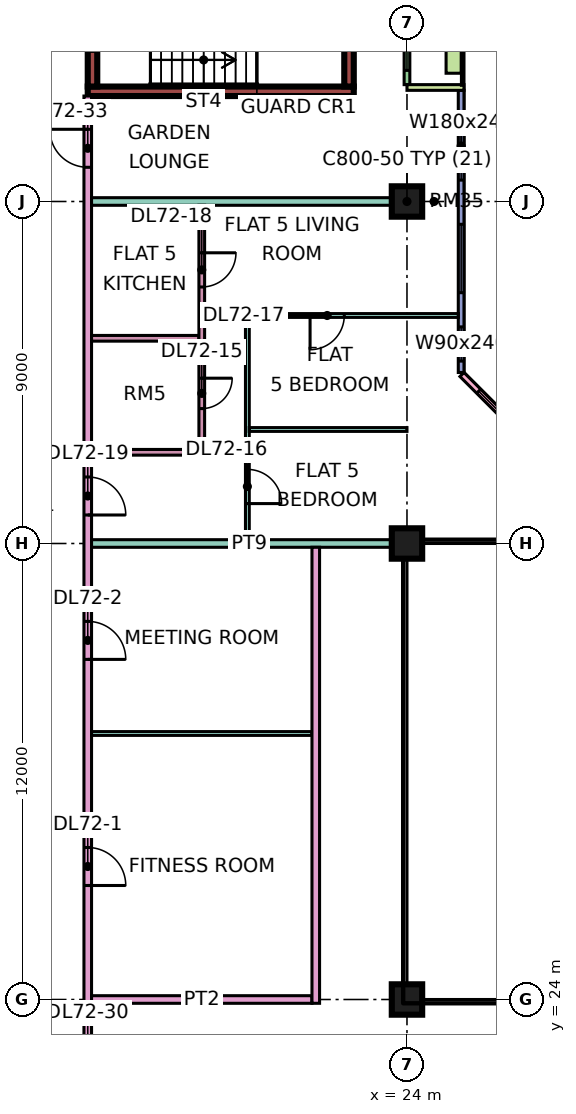
"""IFC4 building model, lengths in metres.
Left out: names, types, materials, properties, quantities, classifications, styles, units other than length and angle.
Written with IfcOpenShell. Run it as: python <this file> out.ifc"""

import sys

from ifc_helpers import new_model, si_unit, direction, frame, frame_2d, origin, origin_2d, place, context, subcontext, project, spatial, rectangle, extrude, element, fill, save


model = new_model("IFC4")
c1 = context("Model", 3, precision=1e-05, world=origin(), true_north=direction((0.0, 1.0)))
c2 = subcontext(c1, "Body", "Model", "MODEL_VIEW")
j1 = project(units=[si_unit("LENGTHUNIT", "METRE"), si_unit("PLANEANGLEUNIT", "RADIAN")], contexts=[c1])
p1 = place(None, origin())
s1 = spatial("IfcSite", under=j1, at=p1, CompositionType="ELEMENT")
p2 = place(p1, origin())
s2 = spatial("IfcBuilding", under=s1, at=p2, CompositionType="ELEMENT")
p3 = place(p2, frame((0.0, 0.0, 307.15)))
s3 = spatial("IfcBuildingStorey", under=s2, at=p3, CompositionType="ELEMENT", Elevation=307.15)
for number, where, z_axis, x_axis in (
    (1, (24.0, 24.0, 0.0), (0.0, 0.0, 1.0), (1.0, 0.0, 0.0)),
    (2, (24.0, 36.0, 0.0), (0.0, 0.0, 1.0), (1.0, 0.0, 0.0)),
    (3, (24.0, 45.0, 0.0), (0.0, 0.0, 1.0), (1.0, 0.0, 0.0)),
):
    element("IfcColumn", number, at=place(p3, frame(where, z_axis=z_axis, x_axis=x_axis)), inside=s3, PredefinedType="COLUMN", context=c2, shape_type="SweptSolid", body=[
        extrude(rectangle(XDim=0.8, YDim=0.8, at=origin_2d()), origin(), (0.0, 0.0, 1.0), 3.75),
    ])
p4 = place(p3, frame((15.6, 47.9, 0.0), z_axis=(0.0, 0.0, 1.0), x_axis=(1.0, 0.0, 0.0)))
e4 = element("IfcWall", 4, at=p4, inside=s3, PredefinedType="SHEAR", context=c2, shape_type="SweptSolid", body=[
    extrude(rectangle(XDim=7.0, YDim=0.25, at=frame_2d((3.5, 0.0))), origin(), (0.0, 0.0, 1.0), 3.75),
])
p5 = place(p3, frame((15.725, 48.025, 0.0), z_axis=(0.0, 0.0, 1.0), x_axis=(0.0, 1.0, 0.0)))
e5 = element("IfcWall", 5, at=p5, inside=s3, PredefinedType="SHEAR", context=c2, shape_type="SweptSolid", body=[
    extrude(rectangle(XDim=2.95, YDim=0.25, at=frame_2d((1.475, 0.0))), origin(), (0.0, 0.0, 1.0), 3.75),
])
p6 = place(p5, frame((0.925, 0.0, 0.0)))
e6 = element("IfcOpeningElement", 6, at=p6, cuts=e5, PredefinedType="OPENING", context=c2, shape_type="SweptSolid", body=[
    extrude(rectangle(XDim=1.1, YDim=2.2, at=frame_2d((0.55, 1.1))), frame((0.0, 0.135, 0.0), z_axis=(0.0, -1.0, 0.0), x_axis=(1.0, 0.0, 0.0)), (0.0, 0.0, 1.0), 0.27),
])
p7 = place(p3, frame((22.475, 48.025, 0.0), z_axis=(0.0, 0.0, 1.0), x_axis=(0.0, 1.0, 0.0)))
e7 = element("IfcWall", 7, at=p7, inside=s3, PredefinedType="SHEAR", context=c2, shape_type="SweptSolid", body=[
    extrude(rectangle(XDim=2.95, YDim=0.25, at=frame_2d((1.475, 0.0))), origin(), (0.0, 0.0, 1.0), 3.75),
])
p8 = place(p3, frame((28.447, 37.447, 0.0), z_axis=(0.0, 0.0, 1.0), x_axis=(-0.707106781187, 0.707106781187, 0.0)))
e8 = element("IfcWall", 8, at=p8, inside=s3, PredefinedType="SOLIDWALL", context=c2, shape_type="SweptSolid", body=[
    extrude(rectangle(XDim=4.243, YDim=0.15, at=frame_2d((2.121, 0.0))), origin(), (0.0, 0.0, 1.0), 3.35),
])
p9 = place(p8, frame((0.621, 0.0, 0.45)))
e9 = element("IfcOpeningElement", 9, at=p9, cuts=e8, PredefinedType="OPENING", context=c2, shape_type="SweptSolid", body=[
    extrude(rectangle(XDim=3.0, YDim=2.4, at=frame_2d((1.5, 1.2))), frame((0.0, 0.085, 0.0), z_axis=(0.0, -1.0, 0.0), x_axis=(1.0, 0.0, 0.0)), (0.0, 0.0, 1.0), 0.17),
])
p10 = place(p3, frame((25.425, 40.5, 0.0), z_axis=(0.0, 0.0, 1.0), x_axis=(0.0, 1.0, 0.0)))
e10 = element("IfcWall", 10, at=p10, inside=s3, PredefinedType="SOLIDWALL", context=c2, shape_type="SweptSolid", body=[
    extrude(rectangle(XDim=7.425, YDim=0.15, at=frame_2d((3.712, 0.0))), origin(), (0.0, 0.0, 1.0), 3.35),
])
p11 = place(p10, frame((0.3, 0.0, 0.45)))
e11 = element("IfcOpeningElement", 11, at=p11, cuts=e10, PredefinedType="OPENING", context=c2, shape_type="SweptSolid", body=[
    extrude(rectangle(XDim=0.9, YDim=2.4, at=frame_2d((0.45, 1.2))), frame((0.0, 0.085, 0.0), z_axis=(0.0, -1.0, 0.0), x_axis=(1.0, 0.0, 0.0)), (0.0, 0.0, 1.0), 0.17),
])
p12 = place(p10, frame((2.1, 0.0, 0.45)))
e12 = element("IfcOpeningElement", 12, at=p12, cuts=e10, PredefinedType="OPENING", context=c2, shape_type="SweptSolid", body=[
    extrude(rectangle(XDim=1.8, YDim=2.4, at=frame_2d((0.9, 1.2))), frame((0.0, 0.085, 0.0), z_axis=(0.0, -1.0, 0.0), x_axis=(1.0, 0.0, 0.0)), (0.0, 0.0, 1.0), 0.17),
])
p13 = place(p10, frame((5.062, 0.0, 0.45)))
e13 = element("IfcOpeningElement", 13, at=p13, cuts=e10, PredefinedType="OPENING", context=c2, shape_type="SweptSolid", body=[
    extrude(rectangle(XDim=1.8, YDim=2.4, at=frame_2d((0.9, 1.2))), frame((0.0, 0.085, 0.0), z_axis=(0.0, -1.0, 0.0), x_axis=(1.0, 0.0, 0.0)), (0.0, 0.0, 1.0), 0.17),
])
p14 = place(p3, frame((24.0, 48.075, 0.0), z_axis=(0.0, 0.0, 1.0), x_axis=(0.0, 1.0, 0.0)))
e14 = element("IfcWall", 14, at=p14, inside=s3, PredefinedType="SOLIDWALL", context=c2, shape_type="SweptSolid", body=[
    extrude(rectangle(XDim=4.35, YDim=0.15, at=frame_2d((2.175, 0.0))), origin(), (0.0, 0.0, 1.0), 3.35),
])
p15 = place(p14, frame((0.375, 0.0, 0.45)))
e15 = element("IfcOpeningElement", 15, at=p15, cuts=e14, PredefinedType="OPENING", context=c2, shape_type="SweptSolid", body=[
    extrude(rectangle(XDim=3.6, YDim=2.4, at=frame_2d((1.8, 1.2))), frame((0.0, 0.085, 0.0), z_axis=(0.0, -1.0, 0.0), x_axis=(1.0, 0.0, 0.0)), (0.0, 0.0, 1.0), 0.17),
])
p16 = place(p3, frame((25.5, 48.0, 0.0), z_axis=(0.0, 0.0, 1.0), x_axis=(-1.0, 0.0, 0.0)))
e16 = element("IfcWall", 16, at=p16, inside=s3, PredefinedType="SOLIDWALL", context=c2, shape_type="SweptSolid", body=[
    extrude(rectangle(XDim=1.5, YDim=0.15, at=frame_2d((0.75, 0.0))), origin(), (0.0, 0.0, 1.0), 3.35),
])
p17 = place(p3, frame((25.229, 48.375, 0.0), z_axis=(0.0, 0.0, 1.0), x_axis=(0.0, 1.0, 0.0)))
e17 = element("IfcWall", 17, at=p17, inside=s3, PredefinedType="SOLIDWALL", context=c2, shape_type="SweptSolid", body=[
    extrude(rectangle(XDim=3.75, YDim=0.4, at=frame_2d((1.875, 0.0))), origin(), (0.0, 0.0, 1.0), 0.7),
])
p18 = place(p3, frame((15.6, 20.0, 0.0), z_axis=(0.0, 0.0, 1.0), x_axis=(0.0, 1.0, 0.0)))
e18 = element("IfcWall", 18, at=p18, inside=s3, PredefinedType="PARTITIONING", context=c2, shape_type="SweptSolid", body=[
    extrude(rectangle(XDim=27.775, YDim=0.2, at=frame_2d((13.887, 0.0))), origin(), (0.0, 0.0, 1.0), 3.35),
])
p19 = place(p18, frame((7.0, 0.0, 0.0)))
e19 = element("IfcOpeningElement", 19, at=p19, cuts=e18, PredefinedType="OPENING", context=c2, shape_type="SweptSolid", body=[
    extrude(rectangle(XDim=1.0, YDim=2.1, at=frame_2d((0.5, 1.05))), frame((0.0, 0.11, 0.0), z_axis=(0.0, -1.0, 0.0), x_axis=(1.0, 0.0, 0.0)), (0.0, 0.0, 1.0), 0.22),
])
p20 = place(p18, frame((12.95, 0.0, 0.0)))
e20 = element("IfcOpeningElement", 20, at=p20, cuts=e18, PredefinedType="OPENING", context=c2, shape_type="SweptSolid", body=[
    extrude(rectangle(XDim=1.0, YDim=2.1, at=frame_2d((0.5, 1.05))), frame((0.0, 0.11, 0.0), z_axis=(0.0, -1.0, 0.0), x_axis=(1.0, 0.0, 0.0)), (0.0, 0.0, 1.0), 0.22),
])
p21 = place(p18, frame((16.75, 0.0, 0.0)))
e21 = element("IfcOpeningElement", 21, at=p21, cuts=e18, PredefinedType="OPENING", context=c2, shape_type="SweptSolid", body=[
    extrude(rectangle(XDim=1.0, YDim=2.1, at=frame_2d((0.5, 1.05))), frame((0.0, 0.11, 0.0), z_axis=(0.0, -1.0, 0.0), x_axis=(1.0, 0.0, 0.0)), (0.0, 0.0, 1.0), 0.22),
])
p22 = place(p18, frame((1.15, 0.0, 0.0)))
e22 = element("IfcOpeningElement", 22, at=p22, cuts=e18, PredefinedType="OPENING", context=c2, shape_type="SweptSolid", body=[
    extrude(rectangle(XDim=1.8, YDim=2.1, at=frame_2d((0.9, 1.05))), frame((0.0, 0.11, 0.0), z_axis=(0.0, -1.0, 0.0), x_axis=(1.0, 0.0, 0.0)), (0.0, 0.0, 1.0), 0.22),
])
p23 = place(p18, frame((25.9, 0.0, 0.0)))
e23 = element("IfcOpeningElement", 23, at=p23, cuts=e18, PredefinedType="OPENING", context=c2, shape_type="SweptSolid", body=[
    extrude(rectangle(XDim=1.0, YDim=2.1, at=frame_2d((0.5, 1.05))), frame((0.0, 0.11, 0.0), z_axis=(0.0, -1.0, 0.0), x_axis=(1.0, 0.0, 0.0)), (0.0, 0.0, 1.0), 0.22),
])
p24 = place(p3, frame((15.7, 24.0, 0.0), z_axis=(0.0, 0.0, 1.0), x_axis=(1.0, 0.0, 0.0)))
e24 = element("IfcWall", 24, at=p24, inside=s3, PredefinedType="PARTITIONING", context=c2, shape_type="SweptSolid", body=[
    extrude(rectangle(XDim=5.8, YDim=0.2, at=frame_2d((2.9, 0.0))), origin(), (0.0, 0.0, 1.0), 3.35),
])
p25 = place(p3, frame((15.7, 31.0, 0.0), z_axis=(0.0, 0.0, 1.0), x_axis=(1.0, 0.0, 0.0)))
e25 = element("IfcWall", 25, at=p25, inside=s3, PredefinedType="PARTITIONING", context=c2, shape_type="SweptSolid", body=[
    extrude(rectangle(XDim=5.8, YDim=0.1, at=frame_2d((2.9, 0.0))), origin(), (0.0, 0.0, 1.0), 3.35),
])
p26 = place(p3, frame((15.7, 36.0, 0.0), z_axis=(0.0, 0.0, 1.0), x_axis=(1.0, 0.0, 0.0)))
e26 = element("IfcWall", 26, at=p26, inside=s3, PredefinedType="PARTITIONING", context=c2, shape_type="SweptSolid", body=[
    extrude(rectangle(XDim=8.3, YDim=0.2, at=frame_2d((4.15, 0.0))), origin(), (0.0, 0.0, 1.0), 3.35),
])
for number, where, z_axis, x_axis in (
    (27, (15.7, 38.4, 0.0), (0.0, 0.0, 1.0), (1.0, 0.0, 0.0)),
    (28, (15.7, 41.4, 0.0), (0.0, 0.0, 1.0), (1.0, 0.0, 0.0)),
):
    element("IfcWall", number, at=place(p3, frame(where, z_axis=z_axis, x_axis=x_axis)), inside=s3, PredefinedType="PARTITIONING", context=c2, shape_type="SweptSolid", body=[
        extrude(rectangle(XDim=2.825, YDim=0.15, at=frame_2d((1.413, 0.0))), origin(), (0.0, 0.0, 1.0), 3.35),
    ])
p27 = place(p3, frame((15.7, 45.0, 0.0), z_axis=(0.0, 0.0, 1.0), x_axis=(1.0, 0.0, 0.0)))
e29 = element("IfcWall", 29, at=p27, inside=s3, PredefinedType="PARTITIONING", context=c2, shape_type="SweptSolid", body=[
    extrude(rectangle(XDim=8.3, YDim=0.2, at=frame_2d((4.15, 0.0))), origin(), (0.0, 0.0, 1.0), 3.35),
])
p28 = place(p3, frame((18.6, 38.325, 0.0), z_axis=(0.0, 0.0, 1.0), x_axis=(0.0, 1.0, 0.0)))
e30 = element("IfcWall", 30, at=p28, inside=s3, PredefinedType="PARTITIONING", context=c2, shape_type="SweptSolid", body=[
    extrude(rectangle(XDim=6.575, YDim=0.15, at=frame_2d((3.288, 0.0))), origin(), (0.0, 0.0, 1.0), 3.35),
])
p29 = place(p28, frame((1.225, 0.0, 0.0)))
e31 = element("IfcOpeningElement", 31, at=p29, cuts=e30, PredefinedType="OPENING", context=c2, shape_type="SweptSolid", body=[
    extrude(rectangle(XDim=0.8, YDim=2.1, at=frame_2d((0.4, 1.05))), frame((0.0, 0.085, 0.0), z_axis=(0.0, -1.0, 0.0), x_axis=(1.0, 0.0, 0.0)), (0.0, 0.0, 1.0), 0.17),
])
p30 = place(p28, frame((4.425, 0.0, 0.0)))
e32 = element("IfcOpeningElement", 32, at=p30, cuts=e30, PredefinedType="OPENING", context=c2, shape_type="SweptSolid", body=[
    extrude(rectangle(XDim=0.9, YDim=2.1, at=frame_2d((0.45, 1.05))), frame((0.0, 0.085, 0.0), z_axis=(0.0, -1.0, 0.0), x_axis=(1.0, 0.0, 0.0)), (0.0, 0.0, 1.0), 0.17),
])
p31 = place(p3, frame((19.8, 36.1, 0.0), z_axis=(0.0, 0.0, 1.0), x_axis=(0.0, 1.0, 0.0)))
e33 = element("IfcWall", 33, at=p31, inside=s3, PredefinedType="PARTITIONING", context=c2, shape_type="SweptSolid", body=[
    extrude(rectangle(XDim=5.95, YDim=0.1, at=frame_2d((2.975, 0.0))), origin(), (0.0, 0.0, 1.0), 3.35),
])
p32 = place(p31, frame((0.95, 0.0, 0.0)))
e34 = element("IfcOpeningElement", 34, at=p32, cuts=e33, PredefinedType="OPENING", context=c2, shape_type="SweptSolid", body=[
    extrude(rectangle(XDim=0.9, YDim=2.1, at=frame_2d((0.45, 1.05))), frame((0.0, 0.06, 0.0), z_axis=(0.0, -1.0, 0.0), x_axis=(1.0, 0.0, 0.0)), (0.0, 0.0, 1.0), 0.12),
])
p33 = place(p3, frame((19.85, 39.0, 0.0), z_axis=(0.0, 0.0, 1.0), x_axis=(1.0, 0.0, 0.0)))
e35 = element("IfcWall", 35, at=p33, inside=s3, PredefinedType="PARTITIONING", context=c2, shape_type="SweptSolid", body=[
    extrude(rectangle(XDim=4.15, YDim=0.1, at=frame_2d((2.075, 0.0))), origin(), (0.0, 0.0, 1.0), 3.35),
])
p34 = place(p3, frame((19.85, 42.0, 0.0), z_axis=(0.0, 0.0, 1.0), x_axis=(1.0, 0.0, 0.0)))
e36 = element("IfcWall", 36, at=p34, inside=s3, PredefinedType="PARTITIONING", context=c2, shape_type="SweptSolid", body=[
    extrude(rectangle(XDim=5.5, YDim=0.1, at=frame_2d((2.75, 0.0))), origin(), (0.0, 0.0, 1.0), 3.35),
])
p35 = place(p34, frame((1.6, 0.0, 0.0)))
e37 = element("IfcOpeningElement", 37, at=p35, cuts=e36, PredefinedType="OPENING", context=c2, shape_type="SweptSolid", body=[
    extrude(rectangle(XDim=0.9, YDim=2.1, at=frame_2d((0.45, 1.05))), frame((0.0, 0.06, 0.0), z_axis=(0.0, -1.0, 0.0), x_axis=(1.0, 0.0, 0.0)), (0.0, 0.0, 1.0), 0.12),
])
p36 = place(p3, frame((21.6, 23.9, 0.0), z_axis=(0.0, 0.0, 1.0), x_axis=(0.0, 1.0, 0.0)))
e38 = element("IfcWall", 38, at=p36, inside=s3, PredefinedType="PARTITIONING", context=c2, shape_type="SweptSolid", body=[
    extrude(rectangle(XDim=12.0, YDim=0.2, at=frame_2d((6.0, 0.0))), origin(), (0.0, 0.0, 1.0), 3.35),
])
p37 = place(p9, origin())
e39 = element("IfcWindow", 39, at=p37, inside=s3, PartitioningType="SINGLE_PANEL", PredefinedType="WINDOW", context=c2, shape_type="SweptSolid", body=[
    extrude(rectangle(XDim=3.0, YDim=2.4, at=frame_2d((1.5, 1.2))), frame((0.0, 0.03, 0.0), z_axis=(0.0, -1.0, 0.0), x_axis=(1.0, 0.0, 0.0)), (0.0, 0.0, 1.0), 0.06),
])
fill(e9, e39)
p38 = place(p11, origin())
e40 = element("IfcWindow", 40, at=p38, inside=s3, PartitioningType="SINGLE_PANEL", PredefinedType="WINDOW", context=c2, shape_type="SweptSolid", body=[
    extrude(rectangle(XDim=0.9, YDim=2.4, at=frame_2d((0.45, 1.2))), frame((0.0, 0.03, 0.0), z_axis=(0.0, -1.0, 0.0), x_axis=(1.0, 0.0, 0.0)), (0.0, 0.0, 1.0), 0.06),
])
fill(e11, e40)
p39 = place(p12, origin())
e41 = element("IfcWindow", 41, at=p39, inside=s3, PartitioningType="SINGLE_PANEL", PredefinedType="WINDOW", context=c2, shape_type="SweptSolid", body=[
    extrude(rectangle(XDim=1.8, YDim=2.4, at=frame_2d((0.9, 1.2))), frame((0.0, 0.03, 0.0), z_axis=(0.0, -1.0, 0.0), x_axis=(1.0, 0.0, 0.0)), (0.0, 0.0, 1.0), 0.06),
])
fill(e12, e41)
p40 = place(p13, origin())
e42 = element("IfcWindow", 42, at=p40, inside=s3, PartitioningType="SINGLE_PANEL", PredefinedType="WINDOW", context=c2, shape_type="SweptSolid", body=[
    extrude(rectangle(XDim=1.8, YDim=2.4, at=frame_2d((0.9, 1.2))), frame((0.0, 0.03, 0.0), z_axis=(0.0, -1.0, 0.0), x_axis=(1.0, 0.0, 0.0)), (0.0, 0.0, 1.0), 0.06),
])
fill(e13, e42)
p41 = place(p15, origin())
e43 = element("IfcWindow", 43, at=p41, inside=s3, PartitioningType="SINGLE_PANEL", PredefinedType="WINDOW", context=c2, shape_type="SweptSolid", body=[
    extrude(rectangle(XDim=3.6, YDim=2.4, at=frame_2d((1.8, 1.2))), frame((0.0, 0.03, 0.0), z_axis=(0.0, -1.0, 0.0), x_axis=(1.0, 0.0, 0.0)), (0.0, 0.0, 1.0), 0.06),
])
fill(e15, e43)
p42 = place(p19, frame((1.0, 0.0, 0.0), z_axis=(0.0, 0.0, 1.0), x_axis=(-1.0, 0.0, 0.0)))
e44 = element("IfcDoor", 44, at=p42, inside=s3, OperationType="SINGLE_SWING_LEFT", PredefinedType="DOOR", context=c2, shape_type="SweptSolid", body=[
    extrude(rectangle(XDim=1.0, YDim=2.1, at=frame_2d((0.5, 1.05))), frame((0.0, 0.025, 0.0), z_axis=(0.0, -1.0, 0.0), x_axis=(1.0, 0.0, 0.0)), (0.0, 0.0, 1.0), 0.05),
])
fill(e19, e44)
p43 = place(p20, frame((1.0, 0.0, 0.0), z_axis=(0.0, 0.0, 1.0), x_axis=(-1.0, 0.0, 0.0)))
e45 = element("IfcDoor", 45, at=p43, inside=s3, OperationType="SINGLE_SWING_LEFT", PredefinedType="DOOR", context=c2, shape_type="SweptSolid", body=[
    extrude(rectangle(XDim=1.0, YDim=2.1, at=frame_2d((0.5, 1.05))), frame((0.0, 0.025, 0.0), z_axis=(0.0, -1.0, 0.0), x_axis=(1.0, 0.0, 0.0)), (0.0, 0.0, 1.0), 0.05),
])
fill(e20, e45)
p44 = place(p29, origin())
e46 = element("IfcDoor", 46, at=p44, inside=s3, OperationType="SINGLE_SWING_RIGHT", PredefinedType="DOOR", context=c2, shape_type="SweptSolid", body=[
    extrude(rectangle(XDim=0.8, YDim=2.1, at=frame_2d((0.4, 1.05))), frame((0.0, 0.025, 0.0), z_axis=(0.0, -1.0, 0.0), x_axis=(1.0, 0.0, 0.0)), (0.0, 0.0, 1.0), 0.05),
])
fill(e31, e46)
p45 = place(p32, frame((0.9, 0.0, 0.0), z_axis=(0.0, 0.0, 1.0), x_axis=(-1.0, 0.0, 0.0)))
e47 = element("IfcDoor", 47, at=p45, inside=s3, OperationType="SINGLE_SWING_LEFT", PredefinedType="DOOR", context=c2, shape_type="SweptSolid", body=[
    extrude(rectangle(XDim=0.9, YDim=2.1, at=frame_2d((0.45, 1.05))), frame((0.0, 0.025, 0.0), z_axis=(0.0, -1.0, 0.0), x_axis=(1.0, 0.0, 0.0)), (0.0, 0.0, 1.0), 0.05),
])
fill(e34, e47)
p46 = place(p35, frame((0.9, 0.0, 0.0), z_axis=(0.0, 0.0, 1.0), x_axis=(-1.0, 0.0, 0.0)))
e48 = element("IfcDoor", 48, at=p46, inside=s3, OperationType="SINGLE_SWING_LEFT", PredefinedType="DOOR", context=c2, shape_type="SweptSolid", body=[
    extrude(rectangle(XDim=0.9, YDim=2.1, at=frame_2d((0.45, 1.05))), frame((0.0, 0.025, 0.0), z_axis=(0.0, -1.0, 0.0), x_axis=(1.0, 0.0, 0.0)), (0.0, 0.0, 1.0), 0.05),
])
fill(e37, e48)
p47 = place(p30, origin())
e49 = element("IfcDoor", 49, at=p47, inside=s3, OperationType="SINGLE_SWING_RIGHT", PredefinedType="DOOR", context=c2, shape_type="SweptSolid", body=[
    extrude(rectangle(XDim=0.9, YDim=2.1, at=frame_2d((0.45, 1.05))), frame((0.0, 0.025, 0.0), z_axis=(0.0, -1.0, 0.0), x_axis=(1.0, 0.0, 0.0)), (0.0, 0.0, 1.0), 0.05),
])
fill(e32, e49)
p48 = place(p21, frame((1.0, 0.0, 0.0), z_axis=(0.0, 0.0, 1.0), x_axis=(-1.0, 0.0, 0.0)))
e50 = element("IfcDoor", 50, at=p48, inside=s3, OperationType="SINGLE_SWING_LEFT", PredefinedType="DOOR", context=c2, shape_type="SweptSolid", body=[
    extrude(rectangle(XDim=1.0, YDim=2.1, at=frame_2d((0.5, 1.05))), frame((0.0, 0.025, 0.0), z_axis=(0.0, -1.0, 0.0), x_axis=(1.0, 0.0, 0.0)), (0.0, 0.0, 1.0), 0.05),
])
fill(e21, e50)
p49 = place(p23, frame((1.0, 0.0, 0.0), z_axis=(0.0, 0.0, 1.0), x_axis=(-1.0, 0.0, 0.0)))
e51 = element("IfcDoor", 51, at=p49, inside=s3, OperationType="SINGLE_SWING_RIGHT", PredefinedType="DOOR", context=c2, shape_type="SweptSolid", body=[
    extrude(rectangle(XDim=1.0, YDim=2.1, at=frame_2d((0.5, 1.05))), frame((0.0, 0.025, 0.0), z_axis=(0.0, -1.0, 0.0), x_axis=(1.0, 0.0, 0.0)), (0.0, 0.0, 1.0), 0.05),
])
fill(e23, e51)
save(model, sys.argv[1])
